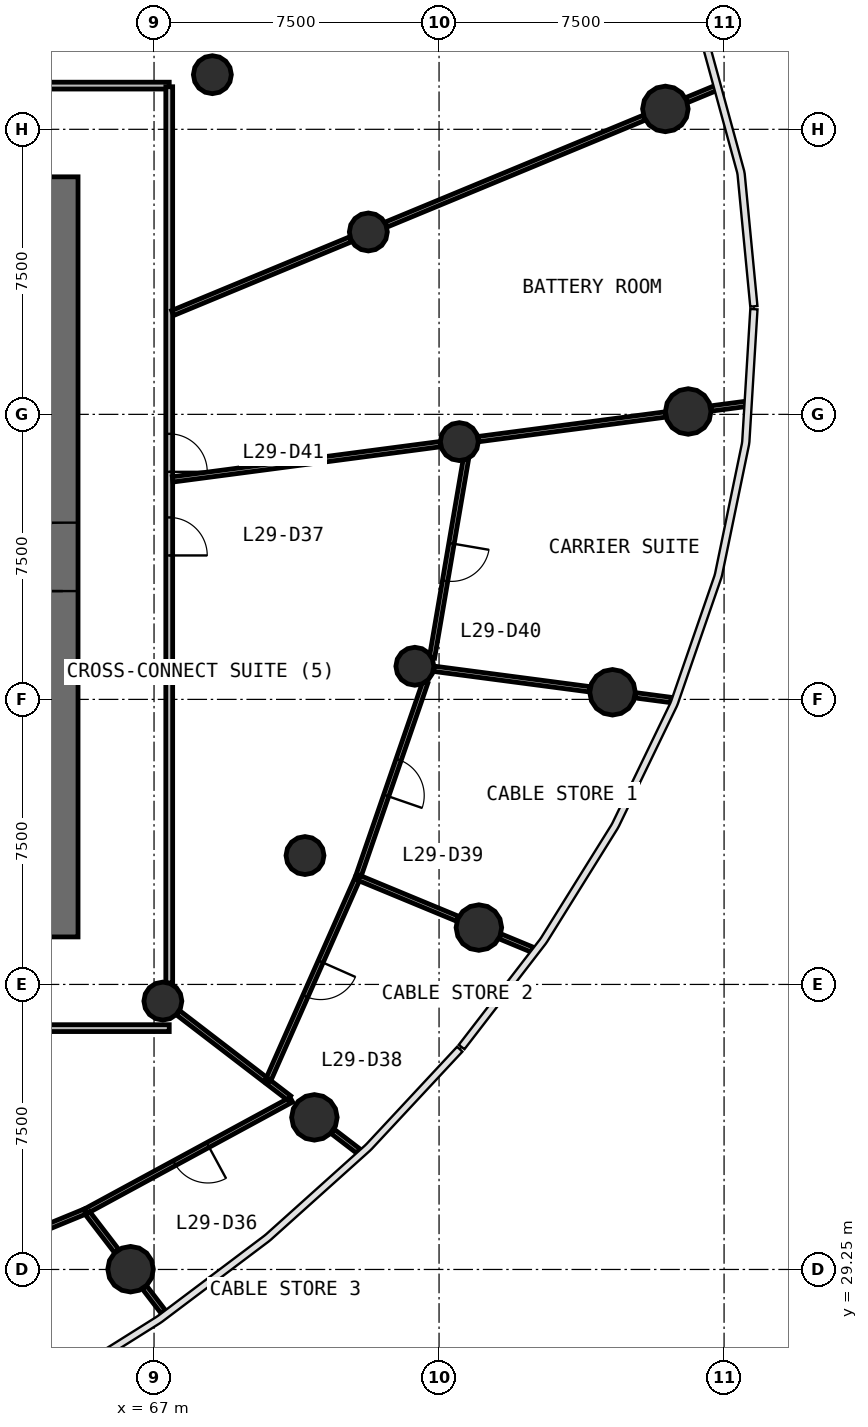
"""IFC4 building model, lengths in metres.
Left out: names, types, materials, properties, quantities, classifications, styles, units other than length and angle.
Written with IfcOpenShell. Run it as: python <this file> out.ifc"""

import sys

from ifc_helpers import new_model, si_unit, direction, frame, frame_2d, origin, origin_2d, place, context, subcontext, project, spatial, rectangle, circle, extrude, source, transform, mapped, element, fill, save


model = new_model("IFC4")
c1 = context("Model", 3, precision=1e-05, world=origin(), true_north=direction((0.0, 1.0)))
c2 = subcontext(c1, "Body", "Model", "MODEL_VIEW")
j1 = project(units=[si_unit("LENGTHUNIT", "METRE"), si_unit("PLANEANGLEUNIT", "RADIAN")], contexts=[c1])
p1 = place(None, origin())
s1 = spatial("IfcSite", under=j1, at=p1, CompositionType="ELEMENT")
p2 = place(p1, origin())
s2 = spatial("IfcBuilding", under=s1, at=p2, CompositionType="ELEMENT")
p3 = place(p2, frame((0.0, 0.0, 124.9)))
s3 = spatial("IfcBuildingStorey", under=s2, at=p3, CompositionType="ELEMENT", Elevation=124.9)
p4 = place(p3, frame((64.6, 38.0, 0.0), z_axis=(0.0, 0.0, 1.0), x_axis=(0.0, 1.0, 0.0)))
e1 = element("IfcWall", 1, at=p4, inside=s3, PredefinedType="SHEAR", context=c2, shape_type="SweptSolid", body=[
    extrude(rectangle(XDim=20.0, YDim=0.8, at=frame_2d((10.0, 0.0))), origin(), (0.0, 0.0, 1.0), 4.1),
])
p5 = place(p4, frame((9.1, 0.0, 0.0)))
e2 = element("IfcOpeningElement", 2, at=p5, cuts=e1, PredefinedType="OPENING", context=c2, shape_type="SweptSolid", body=[
    extrude(rectangle(XDim=1.8, YDim=2.1, at=frame_2d((0.9, 1.05))), frame((0.0, 0.41, 0.0), z_axis=(0.0, -1.0, 0.0), x_axis=(1.0, 0.0, 0.0)), (0.0, 0.0, 1.0), 0.82),
])
m1 = source(origin(), c2, "Body", "SweptSolid", [
    extrude(circle(Radius=0.6, at=origin_2d()), origin(), (0.0, 0.0, 1.0), 4.1),
])
for number, where, z_axis, x_axis in (
    (3, (81.056, 51.825, 0.0), (0.0, 0.0, 1.0), (1.0, 0.0, 0.0)),
    (4, (80.456, 59.787, 0.0), (0.0, 0.0, 1.0), (1.0, 0.0, 0.0)),
    (5, (66.382, 29.257, 0.0), (0.0, 0.0, 1.0), (1.0, 0.0, 0.0)),
    (6, (71.22, 33.252, 0.0), (0.0, 0.0, 1.0), (1.0, 0.0, 0.0)),
    (7, (75.548, 38.246, 0.0), (0.0, 0.0, 1.0), (1.0, 0.0, 0.0)),
    (8, (79.064, 44.437, 0.0), (0.0, 0.0, 1.0), (1.0, 0.0, 0.0)),
):
    element("IfcColumn", number, at=place(p3, frame(where, z_axis=z_axis, x_axis=x_axis)), inside=s3, PredefinedType="COLUMN", context=c2, shape_type="MappedRepresentation", body=[
        mapped(m1, transform((0.0, 0.0, 0.0), scale=1.0)),
    ])
m2 = source(origin(), c2, "Body", "SweptSolid", [
    extrude(circle(Radius=0.5, at=origin_2d()), origin(), (0.0, 0.0, 1.0), 4.1),
])
for number, where, z_axis, x_axis in (
    (9, (75.034, 51.032, 0.0), (0.0, 0.0, 1.0), (1.0, 0.0, 0.0)),
    (10, (72.639, 56.549, 0.0), (0.0, 0.0, 1.0), (1.0, 0.0, 0.0)),
    (11, (68.535, 60.688, 0.0), (0.0, 0.0, 1.0), (1.0, 0.0, 0.0)),
    (12, (67.232, 36.312, 0.0), (0.0, 0.0, 1.0), (1.0, 0.0, 0.0)),
    (13, (70.972, 40.141, 0.0), (0.0, 0.0, 1.0), (1.0, 0.0, 0.0)),
    (14, (73.863, 45.122, 0.0), (0.0, 0.0, 1.0), (1.0, 0.0, 0.0)),
):
    element("IfcColumn", number, at=place(p3, frame(where, z_axis=z_axis, x_axis=x_axis)), inside=s3, PredefinedType="COLUMN", context=c2, shape_type="MappedRepresentation", body=[
        mapped(m2, transform((0.0, 0.0, 0.0), scale=1.0)),
    ])
p6 = place(p3, frame((67.4, 35.6, 0.0), z_axis=(0.0, 0.0, 1.0), x_axis=(-1.0, 0.0, 0.0)))
e15 = element("IfcWall", 15, at=p6, inside=s3, PredefinedType="PARTITIONING", context=c2, shape_type="SweptSolid", body=[
    extrude(rectangle(XDim=30.8, YDim=0.18, at=frame_2d((15.4, 0.0))), origin(), (0.0, 0.0, 1.0), 2.8),
])
p7 = place(p6, frame((17.35, 0.0, 0.0)))
e16 = element("IfcOpeningElement", 16, at=p7, cuts=e15, PredefinedType="OPENING", context=c2, shape_type="SweptSolid", body=[
    extrude(rectangle(XDim=1.0, YDim=2.1, at=frame_2d((0.5, 1.05))), frame((0.0, 0.1, 0.0), z_axis=(0.0, -1.0, 0.0), x_axis=(1.0, 0.0, 0.0)), (0.0, 0.0, 1.0), 0.2),
])
p8 = place(p6, frame((14.95, 0.0, 0.0)))
e17 = element("IfcOpeningElement", 17, at=p8, cuts=e15, PredefinedType="OPENING", context=c2, shape_type="SweptSolid", body=[
    extrude(rectangle(XDim=1.0, YDim=2.1, at=frame_2d((0.5, 1.05))), frame((0.0, 0.1, 0.0), z_axis=(0.0, -1.0, 0.0), x_axis=(1.0, 0.0, 0.0)), (0.0, 0.0, 1.0), 0.2),
])
p9 = place(p6, frame((8.95, 0.0, 0.0)))
e18 = element("IfcOpeningElement", 18, at=p9, cuts=e15, PredefinedType="OPENING", context=c2, shape_type="SweptSolid", body=[
    extrude(rectangle(XDim=1.0, YDim=2.1, at=frame_2d((0.5, 1.05))), frame((0.0, 0.1, 0.0), z_axis=(0.0, -1.0, 0.0), x_axis=(1.0, 0.0, 0.0)), (0.0, 0.0, 1.0), 0.2),
])
p10 = place(p3, frame((36.6, 60.4, 0.0), z_axis=(0.0, 0.0, 1.0), x_axis=(1.0, 0.0, 0.0)))
e19 = element("IfcWall", 19, at=p10, inside=s3, PredefinedType="PARTITIONING", context=c2, shape_type="SweptSolid", body=[
    extrude(rectangle(XDim=30.8, YDim=0.18, at=frame_2d((15.4, 0.0))), origin(), (0.0, 0.0, 1.0), 2.8),
])
p11 = place(p10, frame((14.85, 0.0, 0.0)))
e20 = element("IfcOpeningElement", 20, at=p11, cuts=e19, PredefinedType="OPENING", context=c2, shape_type="SweptSolid", body=[
    extrude(rectangle(XDim=0.9, YDim=2.1, at=frame_2d((0.45, 1.05))), frame((0.0, 0.1, 0.0), z_axis=(0.0, -1.0, 0.0), x_axis=(1.0, 0.0, 0.0)), (0.0, 0.0, 1.0), 0.2),
])
p12 = place(p10, frame((12.65, 0.0, 0.0)))
e21 = element("IfcOpeningElement", 21, at=p12, cuts=e19, PredefinedType="OPENING", context=c2, shape_type="SweptSolid", body=[
    extrude(rectangle(XDim=0.9, YDim=2.1, at=frame_2d((0.45, 1.05))), frame((0.0, 0.1, 0.0), z_axis=(0.0, -1.0, 0.0), x_axis=(1.0, 0.0, 0.0)), (0.0, 0.0, 1.0), 0.2),
])
p13 = place(p10, frame((20.95, 0.0, 0.0)))
e22 = element("IfcOpeningElement", 22, at=p13, cuts=e19, PredefinedType="OPENING", context=c2, shape_type="SweptSolid", body=[
    extrude(rectangle(XDim=1.0, YDim=2.1, at=frame_2d((0.5, 1.05))), frame((0.0, 0.1, 0.0), z_axis=(0.0, -1.0, 0.0), x_axis=(1.0, 0.0, 0.0)), (0.0, 0.0, 1.0), 0.2),
])
p14 = place(p10, frame((17.35, 0.0, 0.0)))
e23 = element("IfcOpeningElement", 23, at=p14, cuts=e19, PredefinedType="OPENING", context=c2, shape_type="SweptSolid", body=[
    extrude(rectangle(XDim=1.0, YDim=2.1, at=frame_2d((0.5, 1.05))), frame((0.0, 0.1, 0.0), z_axis=(0.0, -1.0, 0.0), x_axis=(1.0, 0.0, 0.0)), (0.0, 0.0, 1.0), 0.2),
])
p15 = place(p3, frame((67.4, 60.37, 0.0), z_axis=(0.0, 0.0, 1.0), x_axis=(0.0, -1.0, 0.0)))
e24 = element("IfcWall", 24, at=p15, inside=s3, PredefinedType="PARTITIONING", context=c2, shape_type="SweptSolid", body=[
    extrude(rectangle(XDim=23.583, YDim=0.18, at=frame_2d((11.791, 0.0))), origin(), (0.0, 0.0, 1.0), 2.8),
])
p16 = place(p15, frame((11.333, 0.0, 0.0)))
e25 = element("IfcOpeningElement", 25, at=p16, cuts=e24, PredefinedType="OPENING", context=c2, shape_type="SweptSolid", body=[
    extrude(rectangle(XDim=1.0, YDim=2.1, at=frame_2d((0.5, 1.05))), frame((0.0, 0.1, 0.0), z_axis=(0.0, -1.0, 0.0), x_axis=(1.0, 0.0, 0.0)), (0.0, 0.0, 1.0), 0.2),
])
p17 = place(p15, frame((9.133, 0.0, 0.0)))
e26 = element("IfcOpeningElement", 26, at=p17, cuts=e24, PredefinedType="OPENING", context=c2, shape_type="SweptSolid", body=[
    extrude(rectangle(XDim=1.0, YDim=2.1, at=frame_2d((0.5, 1.05))), frame((0.0, 0.1, 0.0), z_axis=(0.0, -1.0, 0.0), x_axis=(1.0, 0.0, 0.0)), (0.0, 0.0, 1.0), 0.2),
])
p18 = place(p3, frame((73.106, 56.742, 0.0), z_axis=(0.0, 0.0, 1.0), x_axis=(0.923867037115, 0.382713597528, 0.0)))
e27 = element("IfcWall", 27, at=p18, inside=s3, PredefinedType="PARTITIONING", context=c2, shape_type="SweptSolid", body=[
    extrude(rectangle(XDim=7.35, YDim=0.14, at=frame_2d((3.675, 0.0))), origin(), (0.0, 0.0, 1.0), 2.8),
])
p19 = place(p3, frame((67.49, 50.039, 0.0), z_axis=(0.0, 0.0, 1.0), x_axis=(0.99144622305, 0.130515848849, 0.0)))
e28 = element("IfcWall", 28, at=p19, inside=s3, PredefinedType="PARTITIONING", context=c2, shape_type="SweptSolid", body=[
    extrude(rectangle(XDim=7.104, YDim=0.14, at=frame_2d((3.552, 0.0))), origin(), (0.0, 0.0, 1.0), 2.8),
])
p20 = place(p3, frame((70.614, 33.717, 0.0), z_axis=(0.0, 0.0, 1.0), x_axis=(-0.878930010096, -0.476950770365, 0.0)))
e29 = element("IfcWall", 29, at=p20, inside=s3, PredefinedType="PARTITIONING", context=c2, shape_type="SweptSolid", body=[
    extrude(rectangle(XDim=6.148, YDim=0.14, at=frame_2d((3.074, 0.0))), origin(), (0.0, 0.0, 1.0), 2.8),
])
p21 = place(p20, frame((2.498, 0.0, 0.0)))
e30 = element("IfcOpeningElement", 30, at=p21, cuts=e29, PredefinedType="OPENING", context=c2, shape_type="SweptSolid", body=[
    extrude(rectangle(XDim=1.0, YDim=2.1, at=frame_2d((0.5, 1.05))), frame((0.0, 0.08, 0.0), z_axis=(0.0, -1.0, 0.0), x_axis=(1.0, 0.0, 0.0)), (0.0, 0.0, 1.0), 0.16),
])
p22 = place(p3, frame((72.365, 39.564, 0.0), z_axis=(0.0, 0.0, 1.0), x_axis=(-0.404918707425, -0.914352689271, 0.0)))
e31 = element("IfcWall", 31, at=p22, inside=s3, PredefinedType="PARTITIONING", context=c2, shape_type="SweptSolid", body=[
    extrude(rectangle(XDim=5.87, YDim=0.14, at=frame_2d((2.935, 0.0))), origin(), (0.0, 0.0, 1.0), 2.8),
])
p23 = place(p22, frame((2.42, 0.0, 0.0)))
e32 = element("IfcOpeningElement", 32, at=p23, cuts=e31, PredefinedType="OPENING", context=c2, shape_type="SweptSolid", body=[
    extrude(rectangle(XDim=1.0, YDim=2.1, at=frame_2d((0.5, 1.05))), frame((0.0, 0.08, 0.0), z_axis=(0.0, -1.0, 0.0), x_axis=(1.0, 0.0, 0.0)), (0.0, 0.0, 1.0), 0.16),
])
p24 = place(p3, frame((65.182, 30.773, 0.0), z_axis=(0.0, 0.0, 1.0), x_axis=(-0.924926811929, -0.380145225637, 0.0)))
e33 = element("IfcWall", 33, at=p24, inside=s3, PredefinedType="PARTITIONING", context=c2, shape_type="SweptSolid", body=[
    extrude(rectangle(XDim=5.586, YDim=0.14, at=frame_2d((2.793, 0.0))), origin(), (0.0, 0.0, 1.0), 2.8),
])
p25 = place(p24, frame((2.336, 0.0, 0.0)))
e34 = element("IfcOpeningElement", 34, at=p25, cuts=e33, PredefinedType="OPENING", context=c2, shape_type="SweptSolid", body=[
    extrude(rectangle(XDim=1.0, YDim=2.1, at=frame_2d((0.5, 1.05))), frame((0.0, 0.08, 0.0), z_axis=(0.0, -1.0, 0.0), x_axis=(1.0, 0.0, 0.0)), (0.0, 0.0, 1.0), 0.16),
])
p26 = place(p3, frame((74.138, 44.698, 0.0), z_axis=(0.0, 0.0, 1.0), x_axis=(-0.32646005137, -0.945211000179, 0.0)))
e35 = element("IfcWall", 35, at=p26, inside=s3, PredefinedType="PARTITIONING", context=c2, shape_type="SweptSolid", body=[
    extrude(rectangle(XDim=5.402, YDim=0.14, at=frame_2d((2.701, 0.0))), origin(), (0.0, 0.0, 1.0), 2.8),
])
p27 = place(p26, frame((2.152, 0.0, 0.0)))
e36 = element("IfcOpeningElement", 36, at=p27, cuts=e35, PredefinedType="OPENING", context=c2, shape_type="SweptSolid", body=[
    extrude(rectangle(XDim=1.0, YDim=2.1, at=frame_2d((0.5, 1.05))), frame((0.0, 0.08, 0.0), z_axis=(0.0, -1.0, 0.0), x_axis=(1.0, 0.0, 0.0)), (0.0, 0.0, 1.0), 0.16),
])
p28 = place(p3, frame((75.205, 50.558, 0.0), z_axis=(0.0, 0.0, 1.0), x_axis=(-0.168509931987, -0.985699955778, 0.0)))
e37 = element("IfcWall", 37, at=p28, inside=s3, PredefinedType="PARTITIONING", context=c2, shape_type="SweptSolid", body=[
    extrude(rectangle(XDim=5.285, YDim=0.14, at=frame_2d((2.643, 0.0))), origin(), (0.0, 0.0, 1.0), 2.8),
])
p29 = place(p28, frame((2.235, 0.0, 0.0)))
e38 = element("IfcOpeningElement", 38, at=p29, cuts=e37, PredefinedType="OPENING", context=c2, shape_type="SweptSolid", body=[
    extrude(rectangle(XDim=1.0, YDim=2.1, at=frame_2d((0.5, 1.05))), frame((0.0, 0.08, 0.0), z_axis=(0.0, -1.0, 0.0), x_axis=(1.0, 0.0, 0.0)), (0.0, 0.0, 1.0), 0.16),
])
p30 = place(p3, frame((67.49, 54.416, 0.0), z_axis=(0.0, 0.0, 1.0), x_axis=(0.923890025086, 0.382658100067, 0.0)))
e39 = element("IfcWall", 39, at=p30, inside=s3, PredefinedType="PARTITIONING", context=c2, shape_type="SweptSolid", body=[
    extrude(rectangle(XDim=5.068, YDim=0.14, at=frame_2d((2.534, 0.0))), origin(), (0.0, 0.0, 1.0), 2.8),
])
p31 = place(p3, frame((75.534, 51.098, 0.0), z_axis=(0.0, 0.0, 1.0), x_axis=(0.991443414541, 0.130537181533, 0.0)))
e40 = element("IfcWall", 40, at=p31, inside=s3, PredefinedType="PARTITIONING", context=c2, shape_type="SweptSolid", body=[
    extrude(rectangle(XDim=4.966, YDim=0.14, at=frame_2d((2.483, 0.0))), origin(), (0.0, 0.0, 1.0), 2.8),
])
p32 = place(p3, frame((74.363, 45.056, 0.0), z_axis=(0.0, 0.0, 1.0), x_axis=(0.991445054296, -0.130524726824, 0.0)))
e41 = element("IfcWall", 41, at=p32, inside=s3, PredefinedType="PARTITIONING", context=c2, shape_type="SweptSolid", body=[
    extrude(rectangle(XDim=4.137, YDim=0.14, at=frame_2d((2.069, 0.0))), origin(), (0.0, 0.0, 1.0), 2.8),
])
p33 = place(p3, frame((67.633, 36.005, 0.0), z_axis=(0.0, 0.0, 1.0), x_axis=(0.793359481557, -0.608753425472, 0.0)))
e42 = element("IfcWall", 42, at=p33, inside=s3, PredefinedType="PARTITIONING", context=c2, shape_type="SweptSolid", body=[
    extrude(rectangle(XDim=2.898, YDim=0.14, at=frame_2d((1.449, 0.0))), origin(), (0.0, 0.0, 1.0), 2.8),
])
p34 = place(p3, frame((72.393, 39.553, 0.0), z_axis=(0.0, 0.0, 1.0), x_axis=(0.923877031545, -0.382689470177, 0.0)))
e43 = element("IfcWall", 43, at=p34, inside=s3, PredefinedType="PARTITIONING", context=c2, shape_type="SweptSolid", body=[
    extrude(rectangle(XDim=2.81, YDim=0.14, at=frame_2d((1.405, 0.0))), origin(), (0.0, 0.0, 1.0), 2.8),
])
p35 = place(p3, frame((65.253, 30.729, 0.0), z_axis=(0.0, 0.0, 1.0), x_axis=(0.608927359571, -0.793225989719, 0.0)))
e44 = element("IfcWall", 44, at=p35, inside=s3, PredefinedType="PARTITIONING", context=c2, shape_type="SweptSolid", body=[
    extrude(rectangle(XDim=1.25, YDim=0.14, at=frame_2d((0.625, 0.0))), origin(), (0.0, 0.0, 1.0), 2.8),
])
p36 = place(p3, frame((79.664, 44.358, 0.0), z_axis=(0.0, 0.0, 1.0), x_axis=(0.991449038396, -0.130494460661, 0.0)))
e45 = element("IfcWall", 45, at=p36, inside=s3, PredefinedType="PARTITIONING", context=c2, shape_type="SweptSolid", body=[
    extrude(rectangle(XDim=0.948, YDim=0.14, at=frame_2d((0.474, 0.0))), origin(), (0.0, 0.0, 1.0), 2.8),
])
p37 = place(p3, frame((81.656, 51.904, 0.0), z_axis=(0.0, 0.0, 1.0), x_axis=(0.991460558593, 0.130406904551, 0.0)))
e46 = element("IfcWall", 46, at=p37, inside=s3, PredefinedType="PARTITIONING", context=c2, shape_type="SweptSolid", body=[
    extrude(rectangle(XDim=0.928, YDim=0.14, at=frame_2d((0.464, 0.0))), origin(), (0.0, 0.0, 1.0), 2.8),
])
p38 = place(p3, frame((76.107, 38.015, 0.0), z_axis=(0.0, 0.0, 1.0), x_axis=(0.923938487003, -0.382541072612, 0.0)))
e47 = element("IfcWall", 47, at=p38, inside=s3, PredefinedType="PARTITIONING", context=c2, shape_type="SweptSolid", body=[
    extrude(rectangle(XDim=0.911, YDim=0.14, at=frame_2d((0.456, 0.0))), origin(), (0.0, 0.0, 1.0), 2.8),
])
p39 = place(p3, frame((71.699, 32.884, 0.0), z_axis=(0.0, 0.0, 1.0), x_axis=(0.793238811862, -0.6089106563, 0.0)))
e48 = element("IfcWall", 48, at=p39, inside=s3, PredefinedType="PARTITIONING", context=c2, shape_type="SweptSolid", body=[
    extrude(rectangle(XDim=0.856, YDim=0.14, at=frame_2d((0.428, 0.0))), origin(), (0.0, 0.0, 1.0), 2.8),
])
p40 = place(p3, frame((81.014, 60.018, 0.0), z_axis=(0.0, 0.0, 1.0), x_axis=(0.923907241147, 0.382616530949, 0.0)))
e49 = element("IfcWall", 49, at=p40, inside=s3, PredefinedType="PARTITIONING", context=c2, shape_type="SweptSolid", body=[
    extrude(rectangle(XDim=0.842, YDim=0.14, at=frame_2d((0.421, 0.0))), origin(), (0.0, 0.0, 1.0), 2.8),
])
p41 = place(p3, frame((66.75, 28.778, 0.0), z_axis=(0.0, 0.0, 1.0), x_axis=(0.608680693656, -0.79341528418, 0.0)))
e50 = element("IfcWall", 50, at=p41, inside=s3, PredefinedType="PARTITIONING", context=c2, shape_type="SweptSolid", body=[
    extrude(rectangle(XDim=0.802, YDim=0.14, at=frame_2d((0.401, 0.0))), origin(), (0.0, 0.0, 1.0), 2.8),
])
p42 = place(p3, frame((70.012, 34.179, 0.0), z_axis=(0.0, 0.0, 1.0), x_axis=(0.79332944937, -0.608792562999, 0.0)))
e51 = element("IfcWall", 51, at=p42, inside=s3, PredefinedType="PARTITIONING", context=c2, shape_type="SweptSolid", body=[
    extrude(rectangle(XDim=0.681, YDim=0.14, at=frame_2d((0.341, 0.0))), origin(), (0.0, 0.0, 1.0), 2.8),
])
m3 = source(origin(), c2, "Body", "SweptSolid", [
    extrude(rectangle(XDim=1.8, YDim=2.1, at=frame_2d((0.9, 1.05))), frame((0.0, 0.025, 0.0), z_axis=(0.0, -1.0, 0.0), x_axis=(1.0, 0.0, 0.0)), (0.0, 0.0, 1.0), 0.05),
])
p43 = place(p5, origin())
e52 = element("IfcDoor", 52, at=p43, inside=s3, OperationType="SINGLE_SWING_LEFT", PredefinedType="DOOR", context=c2, shape_type="MappedRepresentation", body=[
    mapped(m3, transform((0.0, 0.0, 0.0), scale=1.0)),
])
fill(e2, e52)
m4 = source(origin(), c2, "Body", "SweptSolid", [
    extrude(rectangle(XDim=1.0, YDim=2.1, at=frame_2d((0.5, 1.05))), frame((0.0, 0.025, 0.0), z_axis=(0.0, -1.0, 0.0), x_axis=(1.0, 0.0, 0.0)), (0.0, 0.0, 1.0), 0.05),
])
p44 = place(p21, origin())
e53 = element("IfcDoor", 53, at=p44, inside=s3, OperationType="SINGLE_SWING_LEFT", PredefinedType="DOOR", context=c2, shape_type="MappedRepresentation", body=[
    mapped(m4, transform((0.0, 0.0, 0.0), scale=1.0)),
])
fill(e30, e53)
p45 = place(p16, origin())
e54 = element("IfcDoor", 54, at=p45, inside=s3, OperationType="SINGLE_SWING_RIGHT", PredefinedType="DOOR", context=c2, shape_type="MappedRepresentation", body=[
    mapped(m4, transform((0.0, 0.0, 0.0), scale=1.0)),
])
fill(e25, e54)
p46 = place(p23, origin())
e55 = element("IfcDoor", 55, at=p46, inside=s3, OperationType="SINGLE_SWING_LEFT", PredefinedType="DOOR", context=c2, shape_type="MappedRepresentation", body=[
    mapped(m4, transform((0.0, 0.0, 0.0), scale=1.0)),
])
fill(e32, e55)
p47 = place(p27, origin())
e56 = element("IfcDoor", 56, at=p47, inside=s3, OperationType="SINGLE_SWING_RIGHT", PredefinedType="DOOR", context=c2, shape_type="MappedRepresentation", body=[
    mapped(m4, transform((0.0, 0.0, 0.0), scale=1.0)),
])
fill(e36, e56)
p48 = place(p29, origin())
e57 = element("IfcDoor", 57, at=p48, inside=s3, OperationType="SINGLE_SWING_LEFT", PredefinedType="DOOR", context=c2, shape_type="MappedRepresentation", body=[
    mapped(m4, transform((0.0, 0.0, 0.0), scale=1.0)),
])
fill(e38, e57)
p49 = place(p17, origin())
e58 = element("IfcDoor", 58, at=p49, inside=s3, OperationType="SINGLE_SWING_RIGHT", PredefinedType="DOOR", context=c2, shape_type="MappedRepresentation", body=[
    mapped(m4, transform((0.0, 0.0, 0.0), scale=1.0)),
])
fill(e26, e58)
save(model, sys.argv[1])
